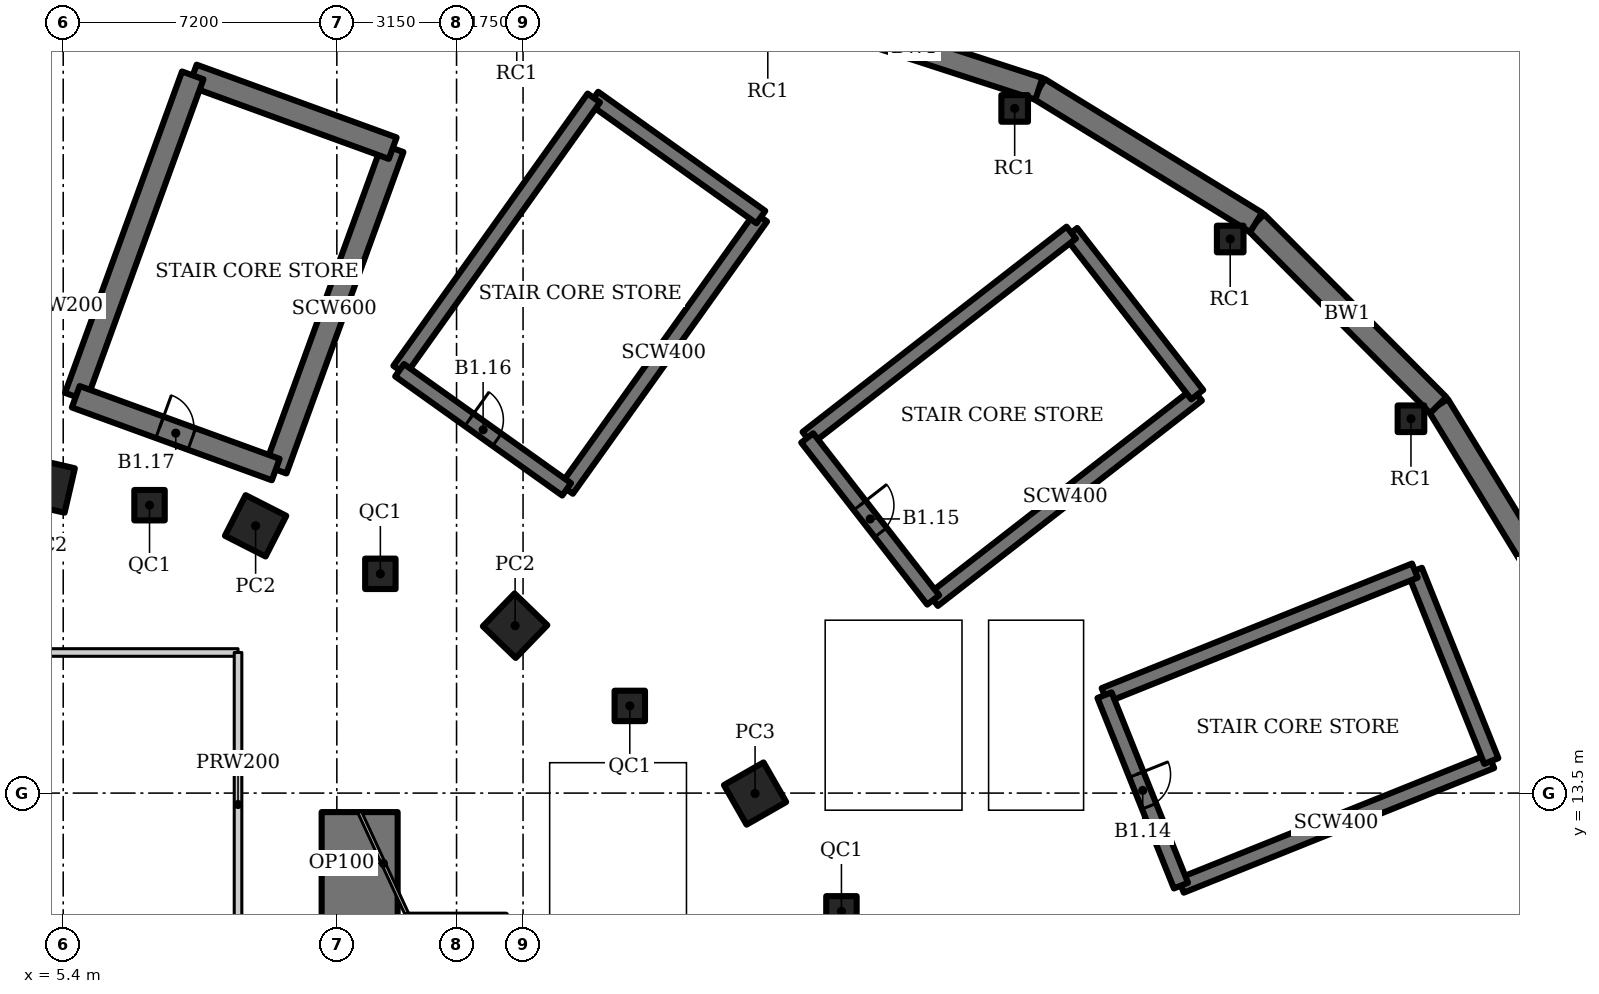
"""IFC4 building model, lengths in metres.
Left out: names, types, materials, properties, quantities, classifications, styles, units other than length and angle.
Written with IfcOpenShell. Run it as: python <this file> out.ifc"""

import sys

from ifc_helpers import new_model, si_unit, direction, frame, frame_2d, origin, origin_2d, place, context, subcontext, project, spatial, rectangle, hollow_rectangle, extrude, element, fill, save


model = new_model("IFC4")
c1 = context("Model", 3, precision=1e-05, world=origin(), true_north=direction((0.0, 1.0)))
c2 = subcontext(c1, "Body", "Model", "MODEL_VIEW")
j1 = project(units=[si_unit("LENGTHUNIT", "METRE"), si_unit("PLANEANGLEUNIT", "RADIAN")], contexts=[c1])
p1 = place(None, origin())
s1 = spatial("IfcSite", under=j1, at=p1, CompositionType="ELEMENT")
p2 = place(p1, origin())
s2 = spatial("IfcBuilding", under=s1, at=p2, CompositionType="ELEMENT")
p3 = place(p2, frame((0.0, 0.0, -5.5)))
s3 = spatial("IfcBuildingStorey", under=s2, at=p3, CompositionType="ELEMENT", Elevation=-5.5)
p4 = place(p3, frame((23.605, 13.489, 0.0), z_axis=(0.0, 0.0, 1.0), x_axis=(0.86824298017, 0.496139221777, 0.0)))
e1 = element("IfcColumn", 1, at=p4, inside=s3, PredefinedType="COLUMN", context=c2, shape_type="SweptSolid", body=[
    extrude(hollow_rectangle(XDim=1.2, YDim=1.2, WallThickness=0.12, at=origin_2d()), origin(), (0.0, 0.0, 1.0), 5.5),
])
for number, where, z_axis, x_axis in (
    (2, (17.291, 17.905, 0.0), (0.0, 0.0, 1.0), (0.695, 0.719, 0.0)),
    (3, (10.463, 20.534, 0.0), (0.0, 0.0, 1.0), (0.454, 0.891, 0.0)),
    (4, (4.986, 21.598, 0.0), (0.0, 0.0, 1.0), (0.225, 0.974, 0.0)),
):
    element("IfcColumn", number, at=place(p3, frame(where, z_axis=z_axis, x_axis=x_axis)), inside=s3, PredefinedType="COLUMN", context=c2, shape_type="SweptSolid", body=[
        extrude(hollow_rectangle(XDim=1.2, YDim=1.2, WallThickness=0.1, at=origin_2d()), origin(), (0.0, 0.0, 1.0), 5.5),
    ])
for number, where, z_axis, x_axis in (
    (5, (25.878, 10.388, 0.0), (0.0, 0.0, 1.0), (1.0, 0.0, 0.0)),
    (6, (20.309, 15.794, 0.0), (0.0, 0.0, 1.0), (1.0, 0.0, 0.0)),
    (7, (13.745, 19.27, 0.0), (0.0, 0.0, 1.0), (1.0, 0.0, 0.0)),
    (8, (7.671, 21.076, 0.0), (0.0, 0.0, 1.0), (1.0, 0.0, 0.0)),
):
    element("IfcColumn", number, at=place(p3, frame(where, z_axis=z_axis, x_axis=x_axis)), inside=s3, PredefinedType="COLUMN", context=c2, shape_type="SweptSolid", body=[
        extrude(hollow_rectangle(XDim=0.8, YDim=0.8, WallThickness=0.05, at=origin_2d()), origin(), (0.0, 0.0, 1.0), 5.5),
    ])
for number, where, z_axis, x_axis in (
    (9, (36.108, 28.081, 0.0), (0.0, 0.0, 1.0), (1.0, 0.0, 0.0)),
    (10, (40.864, 23.351, 0.0), (0.0, 0.0, 1.0), (1.0, 0.0, 0.0)),
    (11, (30.436, 31.518, 0.0), (0.0, 0.0, 1.0), (1.0, 0.0, 0.0)),
):
    element("IfcColumn", number, at=place(p3, frame(where, z_axis=z_axis, x_axis=x_axis)), inside=s3, PredefinedType="COLUMN", context=c2, shape_type="SweptSolid", body=[
        extrude(hollow_rectangle(XDim=0.7, YDim=0.7, WallThickness=0.04, at=origin_2d()), origin(), (0.0, 0.0, 1.0), 5.5),
    ])
p5 = place(p3, frame((13.2, -13.0, 0.0), z_axis=(0.0, 0.0, 1.0), x_axis=(0.0, 1.0, 0.0)))
e12 = element("IfcWall", 12, at=p5, inside=s3, PredefinedType="SHEAR", context=c2, shape_type="SweptSolid", body=[
    extrude(rectangle(XDim=26.0, YDim=2.0, at=frame_2d((13.0, 0.0))), origin(), (0.0, 0.0, 1.0), 5.5),
])
p6 = place(p5, frame((12.1, 0.0, 0.0)))
e13 = element("IfcOpeningElement", 13, at=p6, cuts=e12, PredefinedType="OPENING", context=c2, shape_type="SweptSolid", body=[
    extrude(rectangle(XDim=1.8, YDim=2.1, at=frame_2d((0.9, 1.05))), frame((0.0, 1.01, 0.0), z_axis=(0.0, -1.0, 0.0), x_axis=(1.0, 0.0, 0.0)), (0.0, 0.0, 1.0), 2.02),
])
p7 = place(p3, frame((45.039, 18.064, 0.0), z_axis=(0.0, 0.0, 1.0), x_axis=(-0.522223921517, 0.852808405092, 0.0)))
e14 = element("IfcWall", 14, at=p7, inside=s3, PredefinedType="SOLIDWALL", context=c2, shape_type="SweptSolid", body=[
    extrude(rectangle(XDim=6.621, YDim=0.6, at=frame_2d((3.311, 0.0))), origin(), (0.0, 0.0, 1.0), 5.5),
])
p8 = place(p3, frame((41.582, 23.71, 0.0), z_axis=(0.0, 0.0, 1.0), x_axis=(-0.705901268363, 0.708310242283, 0.0)))
e15 = element("IfcWall", 15, at=p8, inside=s3, PredefinedType="SOLIDWALL", context=c2, shape_type="SweptSolid", body=[
    extrude(rectangle(XDim=6.79, YDim=0.6, at=frame_2d((3.395, 0.0))), origin(), (0.0, 0.0, 1.0), 5.5),
])
p9 = place(p3, frame((36.789, 28.52, 0.0), z_axis=(0.0, 0.0, 1.0), x_axis=(-0.851796965753, 0.523872054165, 0.0)))
e16 = element("IfcWall", 16, at=p9, inside=s3, PredefinedType="SOLIDWALL", context=c2, shape_type="SweptSolid", body=[
    extrude(rectangle(XDim=6.709, YDim=0.6, at=frame_2d((3.355, 0.0))), origin(), (0.0, 0.0, 1.0), 5.5),
])
p10 = place(p3, frame((31.073, 32.034, 0.0), z_axis=(0.0, 0.0, 1.0), x_axis=(-0.951130883604, 0.308788021554, 0.0)))
e17 = element("IfcWall", 17, at=p10, inside=s3, PredefinedType="SOLIDWALL", context=c2, shape_type="SweptSolid", body=[
    extrude(rectangle(XDim=6.89, YDim=0.6, at=frame_2d((3.445, 0.0))), origin(), (0.0, 0.0, 1.0), 5.5),
])
p11 = place(p3, frame((-10.0, 17.2, 0.0), z_axis=(0.0, 0.0, 1.0), x_axis=(1.0, 0.0, 0.0)))
e18 = element("IfcWall", 18, at=p11, inside=s3, PredefinedType="SOLIDWALL", context=c2, shape_type="SweptSolid", body=[
    extrude(rectangle(XDim=20.0, YDim=0.2, at=frame_2d((10.0, 0.0))), origin(), (0.0, 0.0, 1.0), 5.05),
])
p12 = place(p11, frame((9.1, 0.0, 0.0)))
e19 = element("IfcOpeningElement", 19, at=p12, cuts=e18, PredefinedType="OPENING", context=c2, shape_type="SweptSolid", body=[
    extrude(rectangle(XDim=1.8, YDim=2.1, at=frame_2d((0.9, 1.05))), frame((0.0, 0.11, 0.0), z_axis=(0.0, -1.0, 0.0), x_axis=(1.0, 0.0, 0.0)), (0.0, 0.0, 1.0), 0.22),
])
p13 = place(p3, frame((10.0, 9.2, 0.0), z_axis=(0.0, 0.0, 1.0), x_axis=(0.0, 1.0, 0.0)))
e20 = element("IfcWall", 20, at=p13, inside=s3, PredefinedType="SOLIDWALL", context=c2, shape_type="SweptSolid", body=[
    extrude(rectangle(XDim=8.0, YDim=0.2, at=frame_2d((4.0, 0.0))), origin(), (0.0, 0.0, 1.0), 5.05),
])
p14 = place(p3, frame((34.812, 11.065, 0.0), z_axis=(0.0, 0.0, 1.0), x_axis=(0.92801678004, 0.372538395288, 0.0)))
e21 = element("IfcWall", 21, at=p14, inside=s3, PredefinedType="SHEAR", context=c2, shape_type="SweptSolid", body=[
    extrude(rectangle(XDim=8.8, YDim=0.4, at=frame_2d((4.4, 0.0))), origin(), (0.0, 0.0, 1.0), 5.5),
])
p15 = place(p3, frame((42.978, 14.344, 0.0), z_axis=(0.0, 0.0, 1.0), x_axis=(-0.372544066459, 0.928014503414, 0.0)))
e22 = element("IfcWall", 22, at=p15, inside=s3, PredefinedType="SHEAR", context=c2, shape_type="SweptSolid", body=[
    extrude(rectangle(XDim=5.4, YDim=0.4, at=frame_2d((2.7, 0.0))), origin(), (0.0, 0.0, 1.0), 5.5),
])
p16 = place(p3, frame((40.967, 19.355, 0.0), z_axis=(0.0, 0.0, 1.0), x_axis=(-0.92801678004, -0.372538395288, 0.0)))
e23 = element("IfcWall", 23, at=p16, inside=s3, PredefinedType="SHEAR", context=c2, shape_type="SweptSolid", body=[
    extrude(rectangle(XDim=8.8, YDim=0.4, at=frame_2d((4.4, 0.0))), origin(), (0.0, 0.0, 1.0), 5.5),
])
p17 = place(p3, frame((32.8, 16.077, 0.0), z_axis=(0.0, 0.0, 1.0), x_axis=(0.372544066459, -0.928014503414, 0.0)))
e24 = element("IfcWall", 24, at=p17, inside=s3, PredefinedType="SHEAR", context=c2, shape_type="SweptSolid", body=[
    extrude(rectangle(XDim=5.4, YDim=0.4, at=frame_2d((2.7, 0.0))), origin(), (0.0, 0.0, 1.0), 5.5),
])
p18 = place(p17, frame((2.25, 0.0, 0.0)))
e25 = element("IfcOpeningElement", 25, at=p18, cuts=e24, PredefinedType="OPENING", context=c2, shape_type="SweptSolid", body=[
    extrude(rectangle(XDim=0.9, YDim=2.1, at=frame_2d((0.45, 1.05))), frame((0.0, 0.21, 0.0), z_axis=(0.0, -1.0, 0.0), x_axis=(1.0, 0.0, 0.0)), (0.0, 0.0, 1.0), 0.42),
])
p19 = place(p3, frame((28.293, 18.583, 0.0), z_axis=(0.0, 0.0, 1.0), x_axis=(0.78938060008, 0.613904119726, 0.0)))
e26 = element("IfcWall", 26, at=p19, inside=s3, PredefinedType="SHEAR", context=c2, shape_type="SweptSolid", body=[
    extrude(rectangle(XDim=8.8, YDim=0.4, at=frame_2d((4.4, 0.0))), origin(), (0.0, 0.0, 1.0), 5.5),
])
p20 = place(p3, frame((35.239, 23.985, 0.0), z_axis=(0.0, 0.0, 1.0), x_axis=(-0.613912443548, 0.789374126544, 0.0)))
e27 = element("IfcWall", 27, at=p20, inside=s3, PredefinedType="SHEAR", context=c2, shape_type="SweptSolid", body=[
    extrude(rectangle(XDim=5.4, YDim=0.4, at=frame_2d((2.7, 0.0))), origin(), (0.0, 0.0, 1.0), 5.5),
])
p21 = place(p3, frame((31.924, 28.248, 0.0), z_axis=(0.0, 0.0, 1.0), x_axis=(-0.78938060008, -0.613904119726, 0.0)))
e28 = element("IfcWall", 28, at=p21, inside=s3, PredefinedType="SHEAR", context=c2, shape_type="SweptSolid", body=[
    extrude(rectangle(XDim=8.8, YDim=0.4, at=frame_2d((4.4, 0.0))), origin(), (0.0, 0.0, 1.0), 5.5),
])
p22 = place(p3, frame((24.978, 22.846, 0.0), z_axis=(0.0, 0.0, 1.0), x_axis=(0.613912443548, -0.789374126544, 0.0)))
e29 = element("IfcWall", 29, at=p22, inside=s3, PredefinedType="SHEAR", context=c2, shape_type="SweptSolid", body=[
    extrude(rectangle(XDim=5.4, YDim=0.4, at=frame_2d((2.7, 0.0))), origin(), (0.0, 0.0, 1.0), 5.5),
])
p23 = place(p22, frame((2.25, 0.0, 0.0)))
e30 = element("IfcOpeningElement", 30, at=p23, cuts=e29, PredefinedType="OPENING", context=c2, shape_type="SweptSolid", body=[
    extrude(rectangle(XDim=0.9, YDim=2.1, at=frame_2d((0.45, 1.05))), frame((0.0, 0.21, 0.0), z_axis=(0.0, -1.0, 0.0), x_axis=(1.0, 0.0, 0.0)), (0.0, 0.0, 1.0), 0.42),
])
p24 = place(p3, frame((18.647, 21.493, 0.0), z_axis=(0.0, 0.0, 1.0), x_axis=(0.580705313356, 0.814113836659, 0.0)))
e31 = element("IfcWall", 31, at=p24, inside=s3, PredefinedType="SHEAR", context=c2, shape_type="SweptSolid", body=[
    extrude(rectangle(XDim=8.8, YDim=0.4, at=frame_2d((4.4, 0.0))), origin(), (0.0, 0.0, 1.0), 5.5),
])
p25 = place(p3, frame((23.757, 28.657, 0.0), z_axis=(0.0, 0.0, 1.0), x_axis=(-0.814121252423, 0.580694916762, 0.0)))
e32 = element("IfcWall", 32, at=p25, inside=s3, PredefinedType="SHEAR", context=c2, shape_type="SweptSolid", body=[
    extrude(rectangle(XDim=5.4, YDim=0.4, at=frame_2d((2.7, 0.0))), origin(), (0.0, 0.0, 1.0), 5.5),
])
p26 = place(p3, frame((19.361, 31.793, 0.0), z_axis=(0.0, 0.0, 1.0), x_axis=(-0.580705313356, -0.814113836659, 0.0)))
e33 = element("IfcWall", 33, at=p26, inside=s3, PredefinedType="SHEAR", context=c2, shape_type="SweptSolid", body=[
    extrude(rectangle(XDim=8.8, YDim=0.4, at=frame_2d((4.4, 0.0))), origin(), (0.0, 0.0, 1.0), 5.5),
])
p27 = place(p3, frame((14.251, 24.629, 0.0), z_axis=(0.0, 0.0, 1.0), x_axis=(0.814121252423, -0.580694916762, 0.0)))
e34 = element("IfcWall", 34, at=p27, inside=s3, PredefinedType="SHEAR", context=c2, shape_type="SweptSolid", body=[
    extrude(rectangle(XDim=5.4, YDim=0.4, at=frame_2d((2.7, 0.0))), origin(), (0.0, 0.0, 1.0), 5.5),
])
p28 = place(p27, frame((2.25, 0.0, 0.0)))
e35 = element("IfcOpeningElement", 35, at=p28, cuts=e34, PredefinedType="OPENING", context=c2, shape_type="SweptSolid", body=[
    extrude(rectangle(XDim=0.9, YDim=2.1, at=frame_2d((0.45, 1.05))), frame((0.0, 0.21, 0.0), z_axis=(0.0, -1.0, 0.0), x_axis=(1.0, 0.0, 0.0)), (0.0, 0.0, 1.0), 0.42),
])
p29 = place(p3, frame((10.992, 22.014, 0.0), z_axis=(0.0, 0.0, 1.0), x_axis=(0.342013127703, 0.939695174234, 0.0)))
e36 = element("IfcWall", 36, at=p29, inside=s3, PredefinedType="SHEAR", context=c2, shape_type="SweptSolid", body=[
    extrude(rectangle(XDim=9.0, YDim=0.6, at=frame_2d((4.5, 0.0))), origin(), (0.0, 0.0, 1.0), 5.5),
])
p30 = place(p3, frame((14.07, 30.471, 0.0), z_axis=(0.0, 0.0, 1.0), x_axis=(-0.939692822968, 0.342019587834, 0.0)))
e37 = element("IfcWall", 37, at=p30, inside=s3, PredefinedType="SHEAR", context=c2, shape_type="SweptSolid", body=[
    extrude(rectangle(XDim=5.6, YDim=0.6, at=frame_2d((2.8, 0.0))), origin(), (0.0, 0.0, 1.0), 5.5),
])
p31 = place(p3, frame((8.808, 32.387, 0.0), z_axis=(0.0, 0.0, 1.0), x_axis=(-0.3420218461, -0.939692001025, 0.0)))
e38 = element("IfcWall", 38, at=p31, inside=s3, PredefinedType="SHEAR", context=c2, shape_type="SweptSolid", body=[
    extrude(rectangle(XDim=9.0, YDim=0.6, at=frame_2d((4.5, 0.0))), origin(), (0.0, 0.0, 1.0), 5.5),
])
p32 = place(p3, frame((5.73, 23.93, 0.0), z_axis=(0.0, 0.0, 1.0), x_axis=(0.939678810556, -0.342058084236, 0.0)))
e39 = element("IfcWall", 39, at=p32, inside=s3, PredefinedType="SHEAR", context=c2, shape_type="SweptSolid", body=[
    extrude(rectangle(XDim=5.6, YDim=0.6, at=frame_2d((2.8, 0.0))), origin(), (0.0, 0.0, 1.0), 5.5),
])
p33 = place(p32, frame((2.35, 0.0, 0.0)))
e40 = element("IfcOpeningElement", 40, at=p33, cuts=e39, PredefinedType="OPENING", context=c2, shape_type="SweptSolid", body=[
    extrude(rectangle(XDim=0.9, YDim=2.1, at=frame_2d((0.45, 1.05))), frame((0.0, 0.31, 0.0), z_axis=(0.0, -1.0, 0.0), x_axis=(1.0, 0.0, 0.0)), (0.0, 0.0, 1.0), 0.62),
])
p34 = place(p3, frame((13.2, 13.0, 0.0), z_axis=(0.0, 0.0, 1.0), x_axis=(0.420129824888, -0.907464010437, 0.0)))
e41 = element("IfcWall", 41, at=p34, inside=s3, PredefinedType="PARTITIONING", context=c2, shape_type="SweptSolid", body=[
    extrude(rectangle(XDim=2.975, YDim=0.1, at=frame_2d((1.488, 0.0))), origin(), (0.0, 0.0, 1.0), 5.05),
])
p35 = place(p18, origin())
e42 = element("IfcDoor", 42, at=p35, inside=s3, OperationType="SINGLE_SWING_LEFT", PredefinedType="DOOR", context=c2, shape_type="SweptSolid", body=[
    extrude(rectangle(XDim=0.9, YDim=2.1, at=frame_2d((0.45, 1.05))), frame((0.0, 0.025, 0.0), z_axis=(0.0, -1.0, 0.0), x_axis=(1.0, 0.0, 0.0)), (0.0, 0.0, 1.0), 0.05),
])
fill(e25, e42)
p36 = place(p23, origin())
e43 = element("IfcDoor", 43, at=p36, inside=s3, OperationType="SINGLE_SWING_LEFT", PredefinedType="DOOR", context=c2, shape_type="SweptSolid", body=[
    extrude(rectangle(XDim=0.9, YDim=2.1, at=frame_2d((0.45, 1.05))), frame((0.0, 0.025, 0.0), z_axis=(0.0, -1.0, 0.0), x_axis=(1.0, 0.0, 0.0)), (0.0, 0.0, 1.0), 0.05),
])
fill(e30, e43)
p37 = place(p28, origin())
e44 = element("IfcDoor", 44, at=p37, inside=s3, OperationType="SINGLE_SWING_LEFT", PredefinedType="DOOR", context=c2, shape_type="SweptSolid", body=[
    extrude(rectangle(XDim=0.9, YDim=2.1, at=frame_2d((0.45, 1.05))), frame((0.0, 0.025, 0.0), z_axis=(0.0, -1.0, 0.0), x_axis=(1.0, 0.0, 0.0)), (0.0, 0.0, 1.0), 0.05),
])
fill(e35, e44)
p38 = place(p33, origin())
e45 = element("IfcDoor", 45, at=p38, inside=s3, OperationType="SINGLE_SWING_LEFT", PredefinedType="DOOR", context=c2, shape_type="SweptSolid", body=[
    extrude(rectangle(XDim=0.9, YDim=2.1, at=frame_2d((0.45, 1.05))), frame((0.0, 0.025, 0.0), z_axis=(0.0, -1.0, 0.0), x_axis=(1.0, 0.0, 0.0)), (0.0, 0.0, 1.0), 0.05),
])
fill(e40, e45)
save(model, sys.argv[1])
